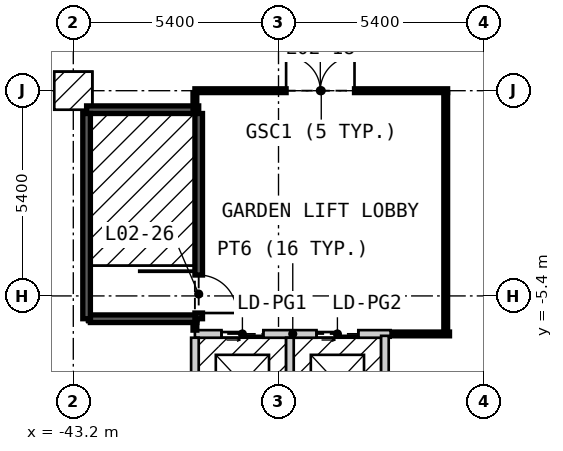
"""IFC4 building model, lengths in metres.
Left out: names, types, materials, properties, quantities, classifications, styles, units other than length and angle.
Written with IfcOpenShell. Run it as: python <this file> out.ifc"""

import sys

from ifc_helpers import new_model, si_unit, direction, frame, frame_2d, origin, place, context, subcontext, project, spatial, rectangle, extrude, element, fill, save


model = new_model("IFC4")
c1 = context("Model", 3, precision=1e-05, world=origin(), true_north=direction((0.0, 1.0)))
c2 = subcontext(c1, "Body", "Model", "MODEL_VIEW")
j1 = project(units=[si_unit("LENGTHUNIT", "METRE"), si_unit("PLANEANGLEUNIT", "RADIAN")], contexts=[c1])
p1 = place(None, origin())
s1 = spatial("IfcSite", under=j1, at=p1, CompositionType="ELEMENT")
p2 = place(p1, origin())
s2 = spatial("IfcBuilding", under=s1, at=p2, CompositionType="ELEMENT")
p3 = place(p2, frame((0.0, 0.0, 9.0)))
s3 = spatial("IfcBuildingStorey", under=s2, at=p3, CompositionType="ELEMENT", Elevation=9.0)
p4 = place(p3, frame((-35.0, -6.4, 0.0), z_axis=(0.0, 0.0, 1.0), x_axis=(1.0, 0.0, 0.0)))
e1 = element("IfcWall", 1, at=p4, inside=s3, PredefinedType="PARTITIONING", context=c2, shape_type="SweptSolid", body=[
    extrude(rectangle(XDim=1.7, YDim=0.1, at=frame_2d((0.85, 0.0))), origin(), (0.0, 0.0, 1.0), 3.2),
])
p5 = place(p3, frame((-40.0, -6.4, 0.0), z_axis=(0.0, 0.0, 1.0), x_axis=(1.0, 0.0, 0.0)))
e2 = element("IfcWall", 2, at=p5, inside=s3, PredefinedType="SOLIDWALL", context=c2, shape_type="SweptSolid", body=[
    extrude(rectangle(XDim=5.15, YDim=0.2, at=frame_2d((2.575, 0.0))), origin(), (0.0, 0.0, 1.0), 6.0),
])
p6 = place(p5, frame((0.7, 0.0, 0.0)))
e3 = element("IfcOpeningElement", 3, at=p6, cuts=e2, PredefinedType="OPENING", context=c2, shape_type="SweptSolid", body=[
    extrude(rectangle(XDim=1.1, YDim=2.1, at=frame_2d((0.55, 1.05))), frame((0.0, 0.11, 0.0), z_axis=(0.0, -1.0, 0.0), x_axis=(1.0, 0.0, 0.0)), (0.0, 0.0, 1.0), 0.22),
])
p7 = place(p5, frame((3.2, 0.0, 0.0)))
e4 = element("IfcOpeningElement", 4, at=p7, cuts=e2, PredefinedType="OPENING", context=c2, shape_type="SweptSolid", body=[
    extrude(rectangle(XDim=1.1, YDim=2.1, at=frame_2d((0.55, 1.05))), frame((0.0, 0.11, 0.0), z_axis=(0.0, -1.0, 0.0), x_axis=(1.0, 0.0, 0.0)), (0.0, 0.0, 1.0), 0.22),
])
p8 = place(p3, frame((-42.75, -6.0, 0.0), z_axis=(0.0, 0.0, 1.0), x_axis=(1.0, 0.0, 0.0)))
e5 = element("IfcWall", 5, at=p8, inside=s3, PredefinedType="SOLIDWALL", context=c2, shape_type="SweptSolid", body=[
    extrude(rectangle(XDim=2.8, YDim=0.2, at=frame_2d((1.4, 0.0))), origin(), (0.0, 0.0, 1.0), 3.0),
])
p9 = place(p3, frame((-42.85, -0.5, 0.0), z_axis=(0.0, 0.0, 1.0), x_axis=(1.0, 0.0, 0.0)))
e6 = element("IfcWall", 6, at=p9, inside=s3, PredefinedType="SOLIDWALL", context=c2, shape_type="SweptSolid", body=[
    extrude(rectangle(XDim=2.95, YDim=0.2, at=frame_2d((1.475, 0.0))), origin(), (0.0, 0.0, 1.0), 3.0),
])
p10 = place(p3, frame((-40.0, 0.0, 0.0), z_axis=(0.0, 0.0, 1.0), x_axis=(1.0, 0.0, 0.0)))
e7 = element("IfcWall", 7, at=p10, inside=s3, PredefinedType="PARTITIONING", context=c2, shape_type="SweptSolid", body=[
    extrude(rectangle(XDim=6.65, YDim=0.1, at=frame_2d((3.325, 0.0))), origin(), (0.0, 0.0, 1.0), 3.2),
])
p11 = place(p10, frame((2.4, 0.0, 0.0)))
e8 = element("IfcOpeningElement", 8, at=p11, cuts=e7, PredefinedType="OPENING", context=c2, shape_type="SweptSolid", body=[
    extrude(rectangle(XDim=1.8, YDim=2.1, at=frame_2d((0.9, 1.05))), frame((0.0, 0.06, 0.0), z_axis=(0.0, -1.0, 0.0), x_axis=(1.0, 0.0, 0.0)), (0.0, 0.0, 1.0), 0.12),
])
p12 = place(p3, frame((-42.85, -6.0, 0.0), z_axis=(0.0, 0.0, 1.0), x_axis=(0.0, 1.0, 0.0)))
e9 = element("IfcWall", 9, at=p12, inside=s3, PredefinedType="SOLIDWALL", context=c2, shape_type="SweptSolid", body=[
    extrude(rectangle(XDim=5.4, YDim=0.2, at=frame_2d((2.7, 0.0))), origin(), (0.0, 0.0, 1.0), 3.0),
])
p13 = place(p3, frame((-40.0, -6.3, 0.0), z_axis=(0.0, 0.0, 1.0), x_axis=(0.0, 1.0, 0.0)))
e10 = element("IfcWall", 10, at=p13, inside=s3, PredefinedType="PARTITIONING", context=c2, shape_type="SweptSolid", body=[
    extrude(rectangle(XDim=0.2, YDim=0.1, at=frame_2d((0.1, 0.0))), origin(), (0.0, 0.0, 1.0), 3.2),
])
p14 = place(p3, frame((-40.0, -0.6, 0.0), z_axis=(0.0, 0.0, 1.0), x_axis=(0.0, 1.0, 0.0)))
e11 = element("IfcWall", 11, at=p14, inside=s3, PredefinedType="PARTITIONING", context=c2, shape_type="SweptSolid", body=[
    extrude(rectangle(XDim=0.55, YDim=0.1, at=frame_2d((0.275, 0.0))), origin(), (0.0, 0.0, 1.0), 3.2),
])
p15 = place(p3, frame((-40.0, -8.9, 0.0), z_axis=(0.0, 0.0, 1.0), x_axis=(0.0, 1.0, 0.0)))
e12 = element("IfcWall", 12, at=p15, inside=s3, PredefinedType="SOLIDWALL", context=c2, shape_type="SweptSolid", body=[
    extrude(rectangle(XDim=2.4, YDim=0.2, at=frame_2d((1.2, 0.0))), origin(), (0.0, 0.0, 1.0), 6.0),
])
p16 = place(p3, frame((-39.9, -6.0, 0.0), z_axis=(0.0, 0.0, 1.0), x_axis=(0.0, 1.0, 0.0)))
e13 = element("IfcWall", 13, at=p16, inside=s3, PredefinedType="SOLIDWALL", context=c2, shape_type="SweptSolid", body=[
    extrude(rectangle(XDim=5.4, YDim=0.2, at=frame_2d((2.7, 0.0))), origin(), (0.0, 0.0, 1.0), 3.0),
])
p17 = place(p16, frame((1.15, 0.0, 0.0), z_axis=(0.0, 0.0, 1.0), x_axis=(-1.0, 0.0, 0.0)))
e14 = element("IfcOpeningElement", 14, at=p17, cuts=e13, PredefinedType="OPENING", context=c2, shape_type="SweptSolid", body=[
    extrude(rectangle(XDim=1.0, YDim=2.1, at=frame_2d((0.5, 1.05))), frame((0.0, 0.11, 0.0), z_axis=(0.0, -1.0, 0.0), x_axis=(1.0, 0.0, 0.0)), (0.0, 0.0, 1.0), 0.22),
])
p18 = place(p3, frame((-37.5, -8.9, 0.0), z_axis=(0.0, 0.0, 1.0), x_axis=(0.0, 1.0, 0.0)))
e15 = element("IfcWall", 15, at=p18, inside=s3, PredefinedType="SOLIDWALL", context=c2, shape_type="SweptSolid", body=[
    extrude(rectangle(XDim=2.4, YDim=0.2, at=frame_2d((1.2, 0.0))), origin(), (0.0, 0.0, 1.0), 6.0),
])
p19 = place(p3, frame((-35.0, -8.9, 0.0), z_axis=(0.0, 0.0, 1.0), x_axis=(0.0, 1.0, 0.0)))
e16 = element("IfcWall", 16, at=p19, inside=s3, PredefinedType="SOLIDWALL", context=c2, shape_type="SweptSolid", body=[
    extrude(rectangle(XDim=2.45, YDim=0.2, at=frame_2d((1.225, 0.0))), origin(), (0.0, 0.0, 1.0), 6.0),
])
p20 = place(p3, frame((-33.4, -6.35, 0.0), z_axis=(0.0, 0.0, 1.0), x_axis=(0.0, 1.0, 0.0)))
e17 = element("IfcWall", 17, at=p20, inside=s3, PredefinedType="PARTITIONING", context=c2, shape_type="SweptSolid", body=[
    extrude(rectangle(XDim=6.3, YDim=0.1, at=frame_2d((3.15, 0.0))), origin(), (0.0, 0.0, 1.0), 3.2),
])
p21 = place(p11, origin())
e18 = element("IfcDoor", 18, at=p21, inside=s3, OperationType="DOUBLE_DOOR_SINGLE_SWING", PredefinedType="DOOR", context=c2, shape_type="SweptSolid", body=[
    extrude(rectangle(XDim=1.8, YDim=2.1, at=frame_2d((0.9, 1.05))), frame((0.0, 0.025, 0.0), z_axis=(0.0, -1.0, 0.0), x_axis=(1.0, 0.0, 0.0)), (0.0, 0.0, 1.0), 0.05),
])
fill(e8, e18)
p22 = place(p6, origin())
e19 = element("IfcDoor", 19, at=p22, inside=s3, OperationType="DOUBLE_DOOR_SLIDING", PredefinedType="DOOR", context=c2, shape_type="SweptSolid", body=[
    extrude(rectangle(XDim=1.1, YDim=2.1, at=frame_2d((0.55, 1.05))), frame((0.0, 0.025, 0.0), z_axis=(0.0, -1.0, 0.0), x_axis=(1.0, 0.0, 0.0)), (0.0, 0.0, 1.0), 0.05),
])
fill(e3, e19)
p23 = place(p7, origin())
e20 = element("IfcDoor", 20, at=p23, inside=s3, OperationType="DOUBLE_DOOR_SLIDING", PredefinedType="DOOR", context=c2, shape_type="SweptSolid", body=[
    extrude(rectangle(XDim=1.1, YDim=2.1, at=frame_2d((0.55, 1.05))), frame((0.0, 0.025, 0.0), z_axis=(0.0, -1.0, 0.0), x_axis=(1.0, 0.0, 0.0)), (0.0, 0.0, 1.0), 0.05),
])
fill(e4, e20)
p24 = place(p17, origin())
e21 = element("IfcDoor", 21, at=p24, inside=s3, OperationType="SINGLE_SWING_RIGHT", PredefinedType="DOOR", context=c2, shape_type="SweptSolid", body=[
    extrude(rectangle(XDim=1.0, YDim=2.1, at=frame_2d((0.5, 1.05))), frame((0.0, 0.025, 0.0), z_axis=(0.0, -1.0, 0.0), x_axis=(1.0, 0.0, 0.0)), (0.0, 0.0, 1.0), 0.05),
])
fill(e14, e21)
save(model, sys.argv[1])
